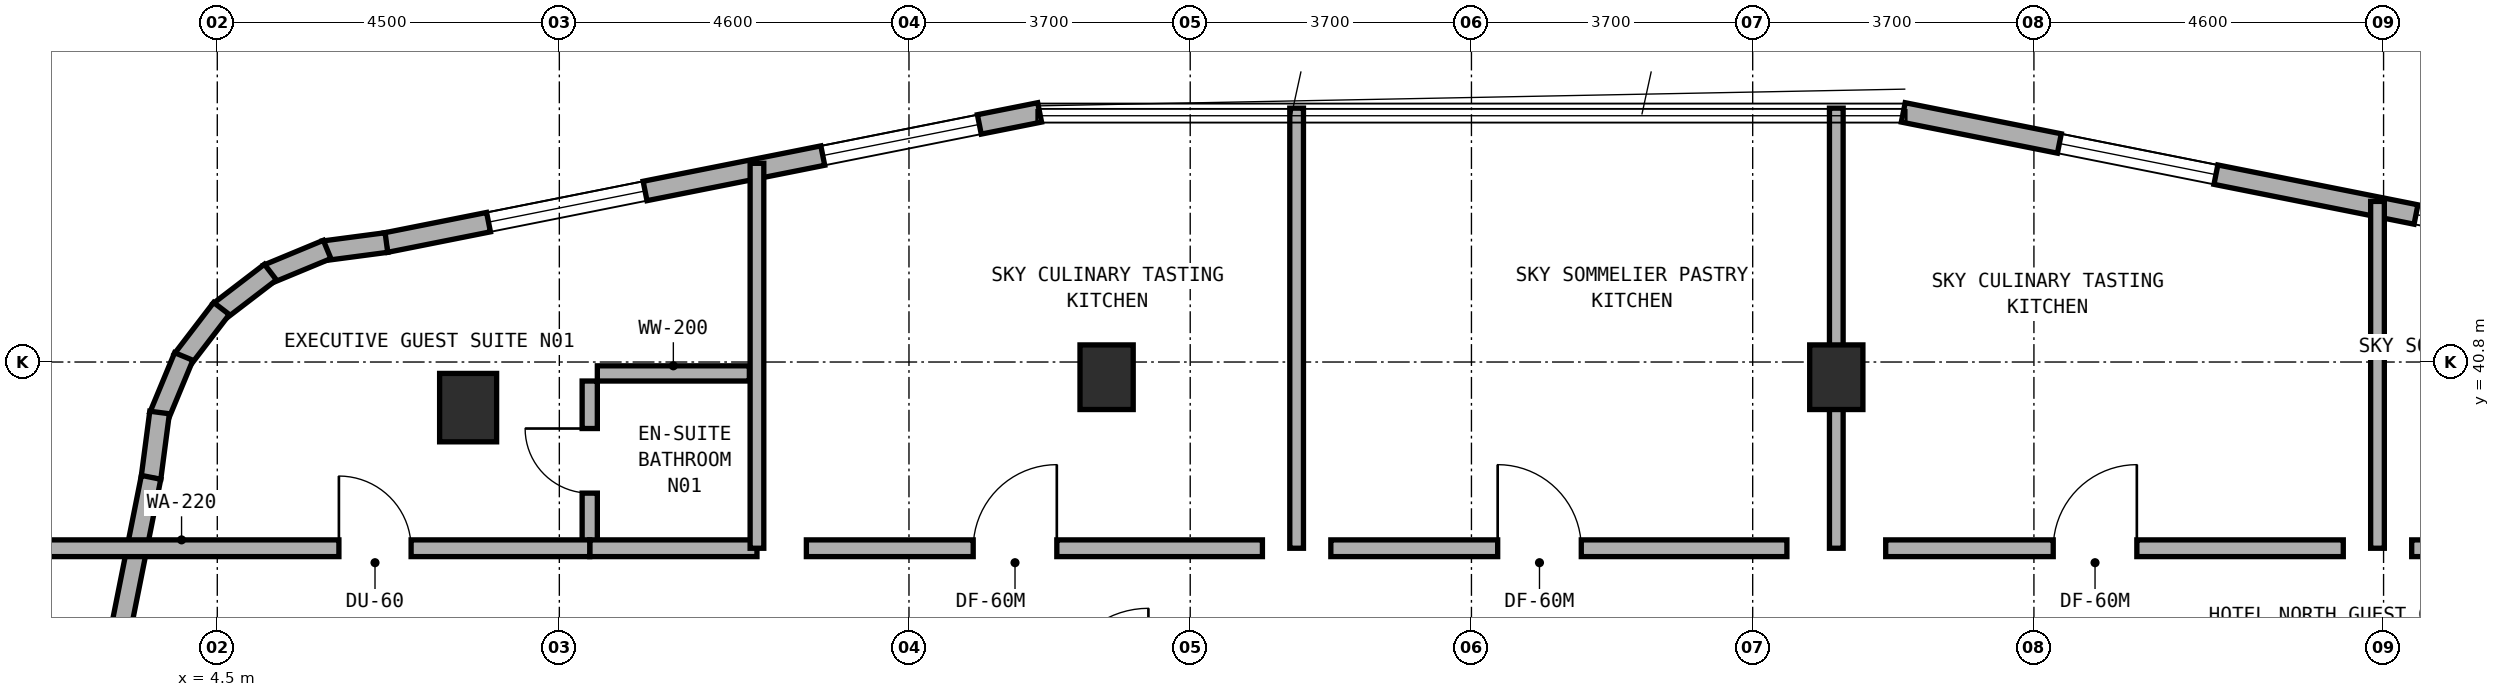
"""IFC4 building model, lengths in metres.
Left out: names, types, materials, properties, quantities, classifications, styles, units other than length and angle.
Written with IfcOpenShell. Run it as: python <this file> out.ifc"""

import sys

from ifc_helpers import new_model, si_unit, direction, frame, frame_2d, origin, origin_2d, place, context, subcontext, project, spatial, rectangle, extrude, element, fill, save


model = new_model("IFC4")
c1 = context("Model", 3, precision=1e-05, world=origin(), true_north=direction((0.0, 1.0)))
c2 = subcontext(c1, "Body", "Model", "MODEL_VIEW")
j1 = project(units=[si_unit("LENGTHUNIT", "METRE"), si_unit("PLANEANGLEUNIT", "RADIAN")], contexts=[c1])
p1 = place(None, origin())
s1 = spatial("IfcSite", under=j1, at=p1, CompositionType="ELEMENT")
p2 = place(p1, origin())
s2 = spatial("IfcBuilding", under=s1, at=p2, CompositionType="ELEMENT")
p3 = place(p2, frame((0.0, 0.0, 209.9)))
s3 = spatial("IfcBuildingStorey", under=s2, at=p3, CompositionType="ELEMENT", Elevation=209.9)
for number, where, z_axis, x_axis in (
    (1, (16.2, 40.6, 0.0), (0.0, 0.0, 1.0), (1.0, 0.0, 0.0)),
    (2, (25.8, 40.6, 0.0), (0.0, 0.0, 1.0), (1.0, 0.0, 0.0)),
):
    element("IfcColumn", number, at=place(p3, frame(where, z_axis=z_axis, x_axis=x_axis)), inside=s3, PredefinedType="COLUMN", context=c2, shape_type="SweptSolid", body=[
        extrude(rectangle(XDim=0.7, YDim=0.85, at=origin_2d()), origin(), (0.0, 0.0, 1.0), 3.6),
    ])
p4 = place(p3, frame((7.8, 40.2, 0.0), z_axis=(0.0, 0.0, 1.0), x_axis=(1.0, 0.0, 0.0)))
e3 = element("IfcColumn", 3, at=p4, inside=s3, PredefinedType="COLUMN", context=c2, shape_type="SweptSolid", body=[
    extrude(rectangle(XDim=0.75, YDim=0.9, at=origin_2d()), origin(), (0.0, 0.0, 1.0), 3.6),
])
p5 = place(p3, frame((35.283, 42.371, 0.0), z_axis=(0.0, 0.0, 1.0), x_axis=(-0.980745199176, 0.195291715883, 0.0)))
e4 = element("IfcWall", 4, at=p5, inside=s3, PredefinedType="STANDARD", context=c2, shape_type="SweptSolid", body=[
    extrude(rectangle(XDim=8.771, YDim=0.26, at=frame_2d((4.385, 0.0))), origin(), (0.0, 0.0, 1.0), 3.32),
])
p6 = place(p5, frame((0.393, 0.0, 0.85)))
e5 = element("IfcOpeningElement", 5, at=p6, cuts=e4, PredefinedType="OPENING", context=c2, shape_type="SweptSolid", body=[
    extrude(rectangle(XDim=1.5, YDim=1.5, at=frame_2d((0.75, 0.75))), frame((0.0, 0.14, 0.0), z_axis=(0.0, -1.0, 0.0), x_axis=(1.0, 0.0, 0.0)), (0.0, 0.0, 1.0), 0.28),
])
p7 = place(p5, frame((4.577, 0.0, 0.85)))
e6 = element("IfcOpeningElement", 6, at=p7, cuts=e4, PredefinedType="OPENING", context=c2, shape_type="SweptSolid", body=[
    extrude(rectangle(XDim=2.1, YDim=1.5, at=frame_2d((1.05, 0.75))), frame((0.0, 0.14, 0.0), z_axis=(0.0, -1.0, 0.0), x_axis=(1.0, 0.0, 0.0)), (0.0, 0.0, 1.0), 0.28),
])
p8 = place(p3, frame((15.319, 44.084, 0.0), z_axis=(0.0, 0.0, 1.0), x_axis=(-0.980745199176, -0.195291715883, 0.0)))
e7 = element("IfcWall", 7, at=p8, inside=s3, PredefinedType="STANDARD", context=c2, shape_type="SweptSolid", body=[
    extrude(rectangle(XDim=8.771, YDim=0.26, at=frame_2d((4.385, 0.0))), origin(), (0.0, 0.0, 1.0), 3.32),
])
p9 = place(p8, frame((0.809, 0.0, 0.85)))
e8 = element("IfcOpeningElement", 8, at=p9, cuts=e7, PredefinedType="OPENING", context=c2, shape_type="SweptSolid", body=[
    extrude(rectangle(XDim=2.1, YDim=1.5, at=frame_2d((1.05, 0.75))), frame((0.0, 0.14, 0.0), z_axis=(0.0, -1.0, 0.0), x_axis=(1.0, 0.0, 0.0)), (0.0, 0.0, 1.0), 0.28),
])
p10 = place(p8, frame((5.293, 0.0, 0.85)))
e9 = element("IfcOpeningElement", 9, at=p10, cuts=e7, PredefinedType="OPENING", context=c2, shape_type="SweptSolid", body=[
    extrude(rectangle(XDim=2.1, YDim=1.5, at=frame_2d((1.05, 0.75))), frame((0.0, 0.14, 0.0), z_axis=(0.0, -1.0, 0.0), x_axis=(1.0, 0.0, 0.0)), (0.0, 0.0, 1.0), 0.28),
])
p11 = place(p3, frame((6.725, 42.372, 0.0), z_axis=(0.0, 0.0, 1.0), x_axis=(-0.9913883573, -0.130954667764, 0.0)))
e10 = element("IfcWall", 10, at=p11, inside=s3, PredefinedType="STANDARD", context=c2, shape_type="SweptSolid", body=[
    extrude(rectangle(XDim=0.833, YDim=0.26, at=frame_2d((0.417, 0.0))), origin(), (0.0, 0.0, 1.0), 3.32),
])
p12 = place(p3, frame((5.945, 42.281, 0.0), z_axis=(0.0, 0.0, 1.0), x_axis=(-0.923754491172, -0.382985169477, 0.0)))
e11 = element("IfcWall", 11, at=p12, inside=s3, PredefinedType="STANDARD", context=c2, shape_type="SweptSolid", body=[
    extrude(rectangle(XDim=0.851, YDim=0.26, at=frame_2d((0.426, 0.0))), origin(), (0.0, 0.0, 1.0), 3.32),
])
for number, where, z_axis, x_axis in (
    (12, (5.199, 41.983, 0.0), (0.0, 0.0, 1.0), (-0.794, -0.608, 0.0)),
    (13, (4.555, 41.504, 0.0), (0.0, 0.0, 1.0), (-0.608, -0.794, 0.0)),
):
    element("IfcWall", number, at=place(p3, frame(where, z_axis=z_axis, x_axis=x_axis)), inside=s3, PredefinedType="STANDARD", context=c2, shape_type="SweptSolid", body=[
        extrude(rectangle(XDim=0.85, YDim=0.26, at=frame_2d((0.425, 0.0))), origin(), (0.0, 0.0, 1.0), 3.32),
    ])
p13 = place(p3, frame((4.059, 40.873, 0.0), z_axis=(0.0, 0.0, 1.0), x_axis=(-0.383229930484, -0.923652976167, 0.0)))
e14 = element("IfcWall", 14, at=p13, inside=s3, PredefinedType="STANDARD", context=c2, shape_type="SweptSolid", body=[
    extrude(rectangle(XDim=0.851, YDim=0.26, at=frame_2d((0.426, 0.0))), origin(), (0.0, 0.0, 1.0), 3.32),
])
p14 = place(p3, frame((3.741, 40.136, 0.0), z_axis=(0.0, 0.0, 1.0), x_axis=(-0.130156359936, -0.991493480548, 0.0)))
e15 = element("IfcWall", 15, at=p14, inside=s3, PredefinedType="STANDARD", context=c2, shape_type="SweptSolid", body=[
    extrude(rectangle(XDim=0.868, YDim=0.26, at=frame_2d((0.434, 0.0))), origin(), (0.0, 0.0, 1.0), 3.32),
])
p15 = place(p3, frame((3.629, 39.283, 0.0), z_axis=(0.0, 0.0, 1.0), x_axis=(-0.195291715883, -0.980745199176, 0.0)))
e16 = element("IfcWall", 16, at=p15, inside=s3, PredefinedType="STANDARD", context=c2, shape_type="SweptSolid", body=[
    extrude(rectangle(XDim=8.771, YDim=0.26, at=frame_2d((4.385, 0.0))), origin(), (0.0, 0.0, 1.0), 3.32),
])
p16 = place(p15, frame((3.873, 0.0, 0.85)))
e17 = element("IfcOpeningElement", 17, at=p16, cuts=e16, PredefinedType="OPENING", context=c2, shape_type="SweptSolid", body=[
    extrude(rectangle(XDim=2.1, YDim=1.5, at=frame_2d((1.05, 0.75))), frame((0.0, 0.14, 0.0), z_axis=(0.0, -1.0, 0.0), x_axis=(1.0, 0.0, 0.0)), (0.0, 0.0, 1.0), 0.28),
])
p17 = place(p3, frame((9.4, 38.45, 0.0), z_axis=(0.0, 0.0, 1.0), x_axis=(0.0, 1.0, 0.0)))
e18 = element("IfcWall", 18, at=p17, inside=s3, PredefinedType="PLUMBINGWALL", context=c2, shape_type="SweptSolid", body=[
    extrude(rectangle(XDim=2.1, YDim=0.2, at=frame_2d((1.05, 0.0))), origin(), (0.0, 0.0, 1.0), 2.935),
])
p18 = place(p17, frame((0.625, 0.0, 0.0)))
e19 = element("IfcOpeningElement", 19, at=p18, cuts=e18, PredefinedType="OPENING", context=c2, shape_type="SweptSolid", body=[
    extrude(rectangle(XDim=0.85, YDim=2.1, at=frame_2d((0.425, 1.05))), frame((0.0, 0.11, 0.0), z_axis=(0.0, -1.0, 0.0), x_axis=(1.0, 0.0, 0.0)), (0.0, 0.0, 1.0), 0.22),
])
p19 = place(p3, frame((9.5, 40.65, 0.0), z_axis=(0.0, 0.0, 1.0), x_axis=(1.0, 0.0, 0.0)))
e20 = element("IfcWall", 20, at=p19, inside=s3, PredefinedType="PLUMBINGWALL", context=c2, shape_type="SweptSolid", body=[
    extrude(rectangle(XDim=2.0, YDim=0.2, at=frame_2d((1.0, 0.0))), origin(), (0.0, 0.0, 1.0), 3.32),
])
p20 = place(p3, frame((9.4, 38.35, 0.0), z_axis=(0.0, 0.0, 1.0), x_axis=(1.0, 0.0, 0.0)))
e21 = element("IfcWall", 21, at=p20, inside=s3, PredefinedType="SOLIDWALL", context=c2, shape_type="SweptSolid", body=[
    extrude(rectangle(XDim=2.2, YDim=0.22, at=frame_2d((1.1, 0.0))), origin(), (0.0, 0.0, 1.0), 3.32),
])
p21 = place(p3, frame((1.96, 38.35, 0.0), z_axis=(0.0, 0.0, 1.0), x_axis=(1.0, 0.0, 0.0)))
e22 = element("IfcWall", 22, at=p21, inside=s3, PredefinedType="SOLIDWALL", context=c2, shape_type="SweptSolid", body=[
    extrude(rectangle(XDim=7.44, YDim=0.22, at=frame_2d((3.72, 0.0))), origin(), (0.0, 0.0, 1.0), 2.695),
])
p22 = place(p21, frame((4.14, 0.0, 0.0)))
e23 = element("IfcOpeningElement", 23, at=p22, cuts=e22, PredefinedType="OPENING", context=c2, shape_type="SweptSolid", body=[
    extrude(rectangle(XDim=0.95, YDim=2.1, at=frame_2d((0.475, 1.05))), frame((0.0, 0.12, 0.0), z_axis=(0.0, -1.0, 0.0), x_axis=(1.0, 0.0, 0.0)), (0.0, 0.0, 1.0), 0.24),
])
p23 = place(p3, frame((11.6, 38.35, 0.0), z_axis=(0.0, 0.0, 1.0), x_axis=(0.0, 1.0, 0.0)))
e24 = element("IfcWall", 24, at=p23, inside=s3, PredefinedType="SOLIDWALL", context=c2, shape_type="SweptSolid", body=[
    extrude(rectangle(XDim=5.064, YDim=0.18, at=frame_2d((2.532, 0.0))), origin(), (0.0, 0.0, 1.0), 2.935),
])
p24 = place(p3, frame((18.7, 38.35, 0.0), z_axis=(0.0, 0.0, 1.0), x_axis=(0.0, 1.0, 0.0)))
e25 = element("IfcWall", 25, at=p24, inside=s3, PredefinedType="SOLIDWALL", context=c2, shape_type="SweptSolid", body=[
    extrude(rectangle(XDim=5.79, YDim=0.18, at=frame_2d((2.895, 0.0))), origin(), (0.0, 0.0, 1.0), 2.935),
])
p25 = place(p3, frame((12.25, 38.35, 0.0), z_axis=(0.0, 0.0, 1.0), x_axis=(1.0, 0.0, 0.0)))
e26 = element("IfcWall", 26, at=p25, inside=s3, PredefinedType="SOLIDWALL", context=c2, shape_type="SweptSolid", body=[
    extrude(rectangle(XDim=6.0, YDim=0.22, at=frame_2d((3.0, 0.0))), origin(), (0.0, 0.0, 1.0), 2.695),
])
p26 = place(p25, frame((2.195, 0.0, 0.0)))
e27 = element("IfcOpeningElement", 27, at=p26, cuts=e26, PredefinedType="OPENING", context=c2, shape_type="SweptSolid", body=[
    extrude(rectangle(XDim=1.1, YDim=2.1, at=frame_2d((0.55, 1.05))), frame((0.0, 0.12, 0.0), z_axis=(0.0, -1.0, 0.0), x_axis=(1.0, 0.0, 0.0)), (0.0, 0.0, 1.0), 0.24),
])
p27 = place(p3, frame((19.15, 38.35, 0.0), z_axis=(0.0, 0.0, 1.0), x_axis=(1.0, 0.0, 0.0)))
e28 = element("IfcWall", 28, at=p27, inside=s3, PredefinedType="SOLIDWALL", context=c2, shape_type="SweptSolid", body=[
    extrude(rectangle(XDim=6.0, YDim=0.22, at=frame_2d((3.0, 0.0))), origin(), (0.0, 0.0, 1.0), 3.32),
])
p28 = place(p27, frame((2.195, 0.0, 0.0)))
e29 = element("IfcOpeningElement", 29, at=p28, cuts=e28, PredefinedType="OPENING", context=c2, shape_type="SweptSolid", body=[
    extrude(rectangle(XDim=1.1, YDim=2.1, at=frame_2d((0.55, 1.05))), frame((0.0, 0.12, 0.0), z_axis=(0.0, -1.0, 0.0), x_axis=(1.0, 0.0, 0.0)), (0.0, 0.0, 1.0), 0.24),
])
p29 = place(p3, frame((25.8, 38.35, 0.0), z_axis=(0.0, 0.0, 1.0), x_axis=(0.0, 1.0, 0.0)))
e30 = element("IfcWall", 30, at=p29, inside=s3, PredefinedType="SOLIDWALL", context=c2, shape_type="SweptSolid", body=[
    extrude(rectangle(XDim=5.79, YDim=0.18, at=frame_2d((2.895, 0.0))), origin(), (0.0, 0.0, 1.0), 2.695),
])
p30 = place(p3, frame((32.92, 38.35, 0.0), z_axis=(0.0, 0.0, 1.0), x_axis=(0.0, 1.0, 0.0)))
e31 = element("IfcWall", 31, at=p30, inside=s3, PredefinedType="SOLIDWALL", context=c2, shape_type="SweptSolid", body=[
    extrude(rectangle(XDim=4.563, YDim=0.18, at=frame_2d((2.281, 0.0))), origin(), (0.0, 0.0, 1.0), 2.935),
])
p31 = place(p3, frame((26.45, 38.35, 0.0), z_axis=(0.0, 0.0, 1.0), x_axis=(1.0, 0.0, 0.0)))
e32 = element("IfcWall", 32, at=p31, inside=s3, PredefinedType="SOLIDWALL", context=c2, shape_type="SweptSolid", body=[
    extrude(rectangle(XDim=6.02, YDim=0.22, at=frame_2d((3.01, 0.0))), origin(), (0.0, 0.0, 1.0), 2.695),
])
p32 = place(p31, frame((2.204, 0.0, 0.0)))
e33 = element("IfcOpeningElement", 33, at=p32, cuts=e32, PredefinedType="OPENING", context=c2, shape_type="SweptSolid", body=[
    extrude(rectangle(XDim=1.1, YDim=2.1, at=frame_2d((0.55, 1.05))), frame((0.0, 0.12, 0.0), z_axis=(0.0, -1.0, 0.0), x_axis=(1.0, 0.0, 0.0)), (0.0, 0.0, 1.0), 0.24),
])
p33 = place(p3, frame((33.37, 38.35, 0.0), z_axis=(0.0, 0.0, 1.0), x_axis=(1.0, 0.0, 0.0)))
e34 = element("IfcWall", 34, at=p33, inside=s3, PredefinedType="SOLIDWALL", context=c2, shape_type="SweptSolid", body=[
    extrude(rectangle(XDim=6.02, YDim=0.22, at=frame_2d((3.01, 0.0))), origin(), (0.0, 0.0, 1.0), 2.695),
])
p34 = place(p33, frame((2.204, 0.0, 0.0)))
e35 = element("IfcOpeningElement", 35, at=p34, cuts=e34, PredefinedType="OPENING", context=c2, shape_type="SweptSolid", body=[
    extrude(rectangle(XDim=1.1, YDim=2.1, at=frame_2d((0.55, 1.05))), frame((0.0, 0.12, 0.0), z_axis=(0.0, -1.0, 0.0), x_axis=(1.0, 0.0, 0.0)), (0.0, 0.0, 1.0), 0.24),
])
p35 = place(p6, origin())
e36 = element("IfcWindow", 36, at=p35, inside=s3, PartitioningType="SINGLE_PANEL", PredefinedType="WINDOW", context=c2, shape_type="SweptSolid", body=[
    extrude(rectangle(XDim=1.5, YDim=1.5, at=frame_2d((0.75, 0.75))), frame((0.0, 0.03, 0.0), z_axis=(0.0, -1.0, 0.0), x_axis=(1.0, 0.0, 0.0)), (0.0, 0.0, 1.0), 0.06),
])
fill(e5, e36)
p36 = place(p7, origin())
e37 = element("IfcWindow", 37, at=p36, inside=s3, PartitioningType="SINGLE_PANEL", PredefinedType="WINDOW", context=c2, shape_type="SweptSolid", body=[
    extrude(rectangle(XDim=2.1, YDim=1.5, at=frame_2d((1.05, 0.75))), frame((0.0, 0.03, 0.0), z_axis=(0.0, -1.0, 0.0), x_axis=(1.0, 0.0, 0.0)), (0.0, 0.0, 1.0), 0.06),
])
fill(e6, e37)
p37 = place(p9, origin())
e38 = element("IfcWindow", 38, at=p37, inside=s3, PartitioningType="SINGLE_PANEL", PredefinedType="WINDOW", context=c2, shape_type="SweptSolid", body=[
    extrude(rectangle(XDim=2.1, YDim=1.5, at=frame_2d((1.05, 0.75))), frame((0.0, 0.03, 0.0), z_axis=(0.0, -1.0, 0.0), x_axis=(1.0, 0.0, 0.0)), (0.0, 0.0, 1.0), 0.06),
])
fill(e8, e38)
p38 = place(p10, origin())
e39 = element("IfcWindow", 39, at=p38, inside=s3, PartitioningType="SINGLE_PANEL", PredefinedType="WINDOW", context=c2, shape_type="SweptSolid", body=[
    extrude(rectangle(XDim=2.1, YDim=1.5, at=frame_2d((1.05, 0.75))), frame((0.0, 0.03, 0.0), z_axis=(0.0, -1.0, 0.0), x_axis=(1.0, 0.0, 0.0)), (0.0, 0.0, 1.0), 0.06),
])
fill(e9, e39)
p39 = place(p18, origin())
e40 = element("IfcDoor", 40, at=p39, inside=s3, OperationType="SINGLE_SWING_RIGHT", PredefinedType="DOOR", context=c2, shape_type="SweptSolid", body=[
    extrude(rectangle(XDim=0.85, YDim=2.1, at=frame_2d((0.425, 1.05))), frame((0.0, 0.025, 0.0), z_axis=(0.0, -1.0, 0.0), x_axis=(1.0, 0.0, 0.0)), (0.0, 0.0, 1.0), 0.05),
])
fill(e19, e40)
p40 = place(p22, origin())
e41 = element("IfcDoor", 41, at=p40, inside=s3, OperationType="SINGLE_SWING_LEFT", PredefinedType="DOOR", context=c2, shape_type="SweptSolid", body=[
    extrude(rectangle(XDim=0.95, YDim=2.1, at=frame_2d((0.475, 1.05))), frame((0.0, 0.025, 0.0), z_axis=(0.0, -1.0, 0.0), x_axis=(1.0, 0.0, 0.0)), (0.0, 0.0, 1.0), 0.05),
])
fill(e23, e41)
p41 = place(p26, origin())
e42 = element("IfcDoor", 42, at=p41, inside=s3, OperationType="SINGLE_SWING_RIGHT", PredefinedType="DOOR", context=c2, shape_type="SweptSolid", body=[
    extrude(rectangle(XDim=1.1, YDim=2.1, at=frame_2d((0.55, 1.05))), frame((0.0, 0.025, 0.0), z_axis=(0.0, -1.0, 0.0), x_axis=(1.0, 0.0, 0.0)), (0.0, 0.0, 1.0), 0.05),
])
fill(e27, e42)
p42 = place(p28, origin())
e43 = element("IfcDoor", 43, at=p42, inside=s3, OperationType="SINGLE_SWING_LEFT", PredefinedType="DOOR", context=c2, shape_type="SweptSolid", body=[
    extrude(rectangle(XDim=1.1, YDim=2.1, at=frame_2d((0.55, 1.05))), frame((0.0, 0.025, 0.0), z_axis=(0.0, -1.0, 0.0), x_axis=(1.0, 0.0, 0.0)), (0.0, 0.0, 1.0), 0.05),
])
fill(e29, e43)
p43 = place(p32, origin())
e44 = element("IfcDoor", 44, at=p43, inside=s3, OperationType="SINGLE_SWING_RIGHT", PredefinedType="DOOR", context=c2, shape_type="SweptSolid", body=[
    extrude(rectangle(XDim=1.1, YDim=2.1, at=frame_2d((0.55, 1.05))), frame((0.0, 0.025, 0.0), z_axis=(0.0, -1.0, 0.0), x_axis=(1.0, 0.0, 0.0)), (0.0, 0.0, 1.0), 0.05),
])
fill(e33, e44)
save(model, sys.argv[1])
